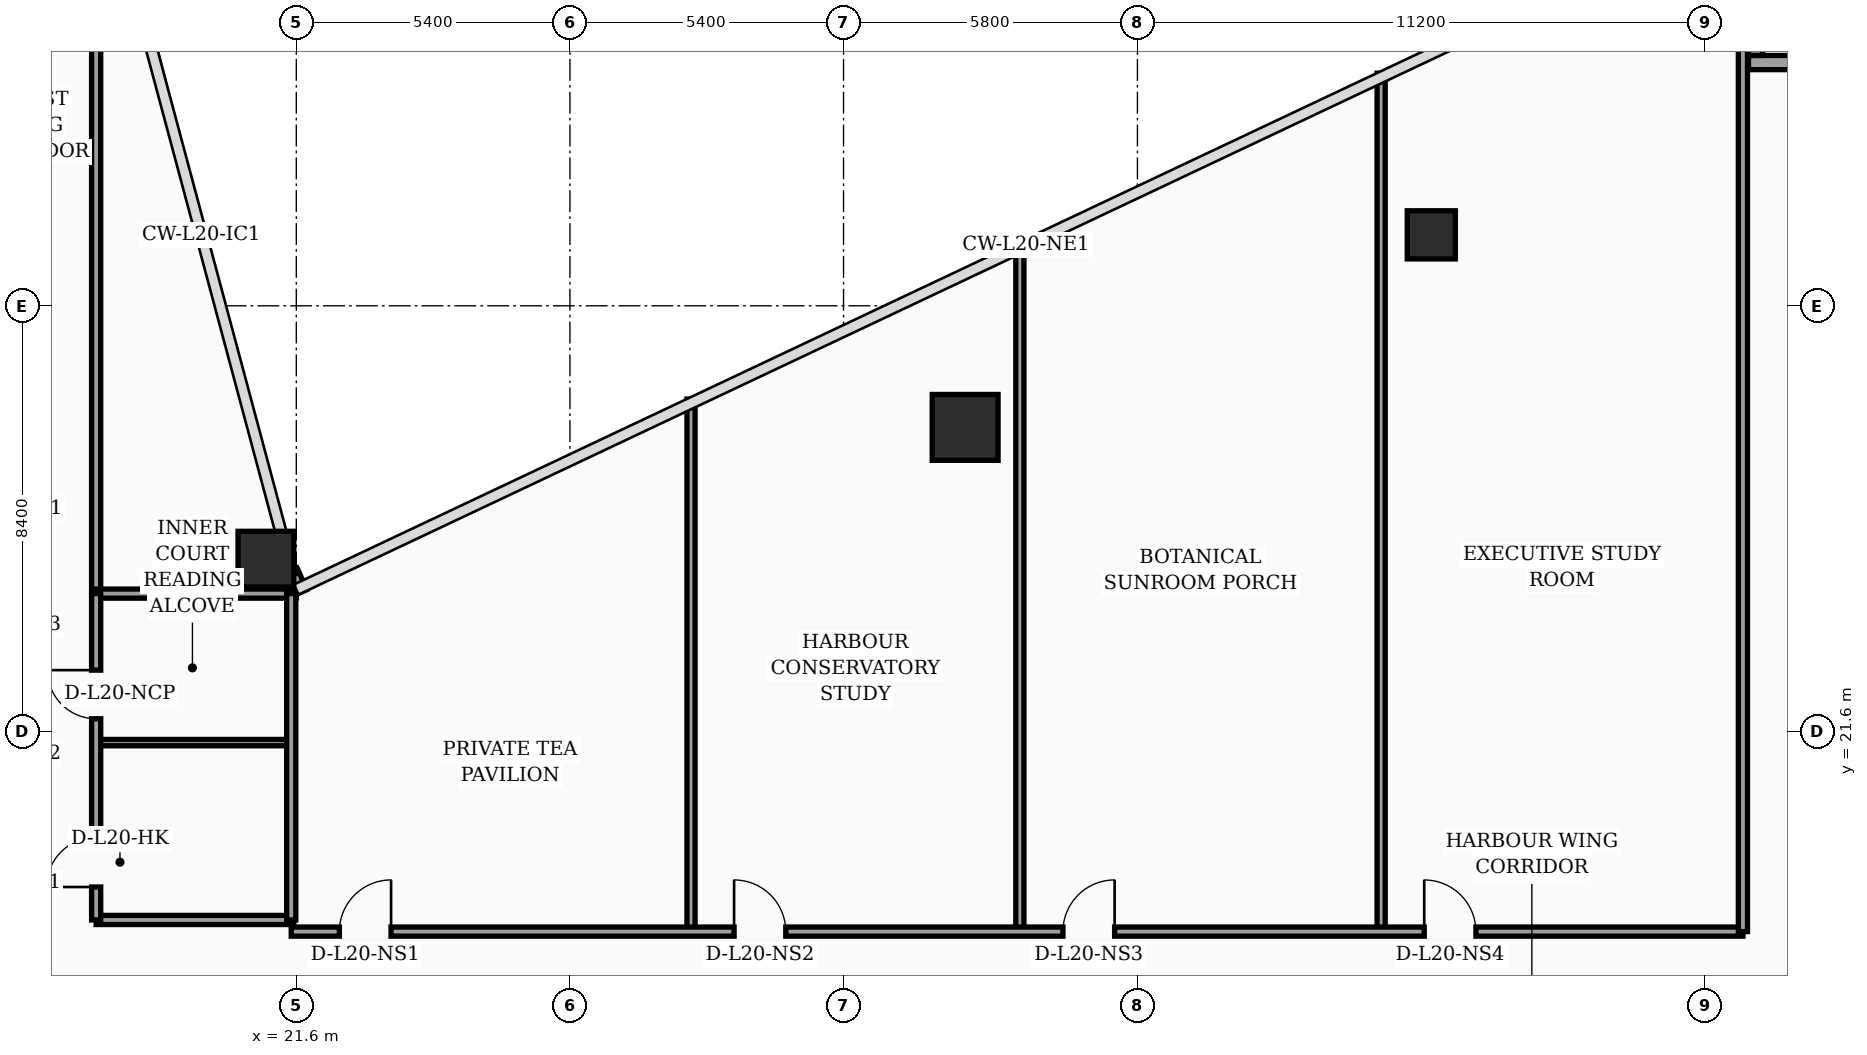
"""IFC4 building model, lengths in metres.
Left out: names, types, materials, properties, quantities, classifications, styles, units other than length and angle.
Written with IfcOpenShell. Run it as: python <this file> out.ifc"""

import sys

from ifc_helpers import new_model, si_unit, direction, frame, frame_2d, origin, origin_2d, place, context, subcontext, project, spatial, rectangle, hollow_rectangle, circle, extrude, element, fill, save


model = new_model("IFC4")
c1 = context("Model", 3, precision=1e-05, world=origin(), true_north=direction((0.0, 1.0)))
c2 = subcontext(c1, "Body", "Model", "MODEL_VIEW")
j1 = project(units=[si_unit("LENGTHUNIT", "METRE"), si_unit("PLANEANGLEUNIT", "RADIAN")], contexts=[c1])
p1 = place(None, origin())
s1 = spatial("IfcSite", under=j1, at=p1, CompositionType="ELEMENT")
p2 = place(p1, origin())
s2 = spatial("IfcBuilding", under=s1, at=p2, CompositionType="ELEMENT")
p3 = place(p2, frame((0.0, 0.0, 85.0)))
s3 = spatial("IfcBuildingStorey", under=s2, at=p3, CompositionType="ELEMENT", Elevation=85.0)
p4 = place(p3, frame((21.0, 25.0, 0.0), z_axis=(0.0, 0.0, 1.0), x_axis=(1.0, 0.0, 0.0)))
e1 = element("IfcColumn", 1, at=p4, inside=s3, PredefinedType="COLUMN", context=c2, shape_type="SweptSolid", body=[
    extrude(hollow_rectangle(XDim=1.1, YDim=1.1, WallThickness=0.045, at=origin_2d()), origin(), (0.0, 0.0, 1.0), 3.56),
])
p5 = place(p3, frame((34.8, 27.6, 0.0), z_axis=(0.0, 0.0, 1.0), x_axis=(1.0, 0.0, 0.0)))
e2 = element("IfcColumn", 2, at=p5, inside=s3, PredefinedType="COLUMN", context=c2, shape_type="SweptSolid", body=[
    extrude(circle(Radius=0.65, at=origin_2d()), origin(), (0.0, 0.0, 1.0), 3.56),
])
p6 = place(p3, frame((44.0, 31.4, 0.0), z_axis=(0.0, 0.0, 1.0), x_axis=(1.0, 0.0, 0.0)))
e3 = element("IfcColumn", 3, at=p6, inside=s3, PredefinedType="COLUMN", context=c2, shape_type="SweptSolid", body=[
    extrude(hollow_rectangle(XDim=0.95, YDim=0.95, WallThickness=0.04, at=origin_2d()), origin(), (0.0, 0.0, 1.0), 3.56),
])
p7 = place(p3, frame((21.68, 24.34, 0.0), z_axis=(0.0, 0.0, 1.0), x_axis=(-0.40758134973, 0.913168901875, 0.0)))
e4 = element("IfcWall", 4, at=p7, inside=s3, PredefinedType="SOLIDWALL", context=c2, shape_type="SweptSolid", body=[
    extrude(rectangle(XDim=0.471, YDim=0.28, at=frame_2d((0.235, 0.0))), origin(), (0.0, 0.0, 1.0), 3.56),
])
p8 = place(p3, frame((54.44, 34.8, 0.0), z_axis=(0.0, 0.0, 1.0), x_axis=(-1.0, 0.0, 0.0)))
e5 = element("IfcWall", 5, at=p8, inside=s3, PredefinedType="SOLIDWALL", context=c2, shape_type="SweptSolid", body=[
    extrude(rectangle(XDim=4.18, YDim=0.28, at=frame_2d((2.09, 0.0))), origin(), (0.0, 0.0, 1.0), 3.56),
])
p9 = place(p3, frame((50.4, 34.94, 0.0), z_axis=(0.0, 0.0, 1.0), x_axis=(0.0, 1.0, 0.0)))
e6 = element("IfcWall", 6, at=p9, inside=s3, PredefinedType="SOLIDWALL", context=c2, shape_type="SweptSolid", body=[
    extrude(rectangle(XDim=3.1, YDim=0.28, at=frame_2d((1.55, 0.0))), origin(), (0.0, 0.0, 1.0), 3.56),
])
p10 = place(p3, frame((17.65, 24.3, 0.0), z_axis=(0.0, 0.0, 1.0), x_axis=(0.0, 1.0, 0.0)))
e7 = element("IfcWall", 7, at=p10, inside=s3, PredefinedType="PARTITIONING", context=c2, shape_type="SweptSolid", body=[
    extrude(rectangle(XDim=16.4, YDim=0.18, at=frame_2d((8.2, 0.0))), origin(), (0.0, 0.0, 1.0), 2.84),
])
p11 = place(p3, frame((17.65, 17.88, 0.0), z_axis=(0.0, 0.0, 1.0), x_axis=(1.0, 0.0, 0.0)))
e8 = element("IfcWall", 8, at=p11, inside=s3, PredefinedType="PARTITIONING", context=c2, shape_type="SweptSolid", body=[
    extrude(rectangle(XDim=3.9, YDim=0.18, at=frame_2d((1.95, 0.0))), origin(), (0.0, 0.0, 1.0), 3.56),
])
p12 = place(p3, frame((17.65, 21.38, 0.0), z_axis=(0.0, 0.0, 1.0), x_axis=(1.0, 0.0, 0.0)))
e9 = element("IfcWall", 9, at=p12, inside=s3, PredefinedType="PARTITIONING", context=c2, shape_type="SweptSolid", body=[
    extrude(rectangle(XDim=3.9, YDim=0.125, at=frame_2d((1.95, 0.0))), origin(), (0.0, 0.0, 1.0), 3.09),
])
p13 = place(p3, frame((17.65, 24.32, 0.0), z_axis=(0.0, 0.0, 1.0), x_axis=(1.0, 0.0, 0.0)))
e10 = element("IfcWall", 10, at=p13, inside=s3, PredefinedType="PARTITIONING", context=c2, shape_type="SweptSolid", body=[
    extrude(rectangle(XDim=3.95, YDim=0.18, at=frame_2d((1.975, 0.0))), origin(), (0.0, 0.0, 1.0), 3.56),
])
p14 = place(p3, frame((21.5, 17.88, 0.0), z_axis=(0.0, 0.0, 1.0), x_axis=(0.0, 1.0, 0.0)))
e11 = element("IfcWall", 11, at=p14, inside=s3, PredefinedType="PARTITIONING", context=c2, shape_type="SweptSolid", body=[
    extrude(rectangle(XDim=6.44, YDim=0.18, at=frame_2d((3.22, 0.0))), origin(), (0.0, 0.0, 1.0), 3.09),
])
p15 = place(p3, frame((17.65, 17.88, 0.0), z_axis=(0.0, 0.0, 1.0), x_axis=(0.0, 1.0, 0.0)))
e12 = element("IfcWall", 12, at=p15, inside=s3, PredefinedType="PARTITIONING", context=c2, shape_type="SweptSolid", body=[
    extrude(rectangle(XDim=6.44, YDim=0.18, at=frame_2d((3.22, 0.0))), origin(), (0.0, 0.0, 1.0), 3.09),
])
p16 = place(p15, frame((0.65, 0.0, 0.0)))
e13 = element("IfcOpeningElement", 13, at=p16, cuts=e12, PredefinedType="OPENING", context=c2, shape_type="SweptSolid", body=[
    extrude(rectangle(XDim=0.98, YDim=2.15, at=frame_2d((0.49, 1.075))), frame((0.0, 0.1, 0.0), z_axis=(0.0, -1.0, 0.0), x_axis=(1.0, 0.0, 0.0)), (0.0, 0.0, 1.0), 0.2),
])
p17 = place(p15, frame((3.97, 0.0, 0.0)))
e14 = element("IfcOpeningElement", 14, at=p17, cuts=e12, PredefinedType="OPENING", context=c2, shape_type="SweptSolid", body=[
    extrude(rectangle(XDim=0.96, YDim=2.2, at=frame_2d((0.48, 1.1))), frame((0.0, 0.1, 0.0), z_axis=(0.0, -1.0, 0.0), x_axis=(1.0, 0.0, 0.0)), (0.0, 0.0, 1.0), 0.2),
])
p18 = place(p3, frame((29.39, 17.65, 0.0), z_axis=(0.0, 0.0, 1.0), x_axis=(0.0, 1.0, 0.0)))
e15 = element("IfcWall", 15, at=p18, inside=s3, PredefinedType="PARTITIONING", context=c2, shape_type="SweptSolid", body=[
    extrude(rectangle(XDim=10.51, YDim=0.16, at=frame_2d((5.255, 0.0))), origin(), (0.0, 0.0, 1.0), 2.84),
])
p19 = place(p3, frame((35.88, 17.65, 0.0), z_axis=(0.0, 0.0, 1.0), x_axis=(0.0, 1.0, 0.0)))
e16 = element("IfcWall", 16, at=p19, inside=s3, PredefinedType="PARTITIONING", context=c2, shape_type="SweptSolid", body=[
    extrude(rectangle(XDim=13.57, YDim=0.16, at=frame_2d((6.785, 0.0))), origin(), (0.0, 0.0, 1.0), 2.84),
])
p20 = place(p3, frame((43.01, 17.65, 0.0), z_axis=(0.0, 0.0, 1.0), x_axis=(0.0, 1.0, 0.0)))
e17 = element("IfcWall", 17, at=p20, inside=s3, PredefinedType="PARTITIONING", context=c2, shape_type="SweptSolid", body=[
    extrude(rectangle(XDim=16.94, YDim=0.16, at=frame_2d((8.47, 0.0))), origin(), (0.0, 0.0, 1.0), 2.84),
])
p21 = place(p3, frame((21.5, 17.65, 0.0), z_axis=(0.0, 0.0, 1.0), x_axis=(1.0, 0.0, 0.0)))
e18 = element("IfcWall", 18, at=p21, inside=s3, PredefinedType="PARTITIONING", context=c2, shape_type="SweptSolid", body=[
    extrude(rectangle(XDim=28.65, YDim=0.18, at=frame_2d((14.325, 0.0))), origin(), (0.0, 0.0, 1.0), 2.84),
])
p22 = place(p21, frame((0.95, 0.0, 0.0)))
e19 = element("IfcOpeningElement", 19, at=p22, cuts=e18, PredefinedType="OPENING", context=c2, shape_type="SweptSolid", body=[
    extrude(rectangle(XDim=1.02, YDim=2.2, at=frame_2d((0.51, 1.1))), frame((0.0, 0.1, 0.0), z_axis=(0.0, -1.0, 0.0), x_axis=(1.0, 0.0, 0.0)), (0.0, 0.0, 1.0), 0.2),
])
p23 = place(p21, frame((8.74, 0.0, 0.0)))
e20 = element("IfcOpeningElement", 20, at=p23, cuts=e18, PredefinedType="OPENING", context=c2, shape_type="SweptSolid", body=[
    extrude(rectangle(XDim=1.02, YDim=2.2, at=frame_2d((0.51, 1.1))), frame((0.0, 0.1, 0.0), z_axis=(0.0, -1.0, 0.0), x_axis=(1.0, 0.0, 0.0)), (0.0, 0.0, 1.0), 0.2),
])
p24 = place(p21, frame((15.23, 0.0, 0.0)))
e21 = element("IfcOpeningElement", 21, at=p24, cuts=e18, PredefinedType="OPENING", context=c2, shape_type="SweptSolid", body=[
    extrude(rectangle(XDim=1.02, YDim=2.2, at=frame_2d((0.51, 1.1))), frame((0.0, 0.1, 0.0), z_axis=(0.0, -1.0, 0.0), x_axis=(1.0, 0.0, 0.0)), (0.0, 0.0, 1.0), 0.2),
])
p25 = place(p21, frame((22.36, 0.0, 0.0)))
e22 = element("IfcOpeningElement", 22, at=p25, cuts=e18, PredefinedType="OPENING", context=c2, shape_type="SweptSolid", body=[
    extrude(rectangle(XDim=1.02, YDim=2.2, at=frame_2d((0.51, 1.1))), frame((0.0, 0.1, 0.0), z_axis=(0.0, -1.0, 0.0), x_axis=(1.0, 0.0, 0.0)), (0.0, 0.0, 1.0), 0.2),
])
p26 = place(p3, frame((50.15, 17.65, 0.0), z_axis=(0.0, 0.0, 1.0), x_axis=(0.0, 1.0, 0.0)))
e23 = element("IfcWall", 23, at=p26, inside=s3, PredefinedType="PARTITIONING", context=c2, shape_type="SweptSolid", body=[
    extrude(rectangle(XDim=20.31, YDim=0.18, at=frame_2d((10.155, 0.0))), origin(), (0.0, 0.0, 1.0), 2.84),
])
p27 = place(p16, origin())
e24 = element("IfcDoor", 24, at=p27, inside=s3, OperationType="SINGLE_SWING_LEFT", PredefinedType="DOOR", context=c2, shape_type="SweptSolid", body=[
    extrude(rectangle(XDim=0.98, YDim=2.15, at=frame_2d((0.49, 1.075))), frame((0.0, 0.025, 0.0), z_axis=(0.0, -1.0, 0.0), x_axis=(1.0, 0.0, 0.0)), (0.0, 0.0, 1.0), 0.05),
])
fill(e13, e24)
p28 = place(p17, origin())
e25 = element("IfcDoor", 25, at=p28, inside=s3, OperationType="SINGLE_SWING_RIGHT", PredefinedType="DOOR", context=c2, shape_type="SweptSolid", body=[
    extrude(rectangle(XDim=0.96, YDim=2.2, at=frame_2d((0.48, 1.1))), frame((0.0, 0.025, 0.0), z_axis=(0.0, -1.0, 0.0), x_axis=(1.0, 0.0, 0.0)), (0.0, 0.0, 1.0), 0.05),
])
fill(e14, e25)
p29 = place(p22, origin())
e26 = element("IfcDoor", 26, at=p29, inside=s3, OperationType="SINGLE_SWING_RIGHT", PredefinedType="DOOR", context=c2, shape_type="SweptSolid", body=[
    extrude(rectangle(XDim=1.02, YDim=2.2, at=frame_2d((0.51, 1.1))), frame((0.0, 0.025, 0.0), z_axis=(0.0, -1.0, 0.0), x_axis=(1.0, 0.0, 0.0)), (0.0, 0.0, 1.0), 0.05),
])
fill(e19, e26)
p30 = place(p23, origin())
e27 = element("IfcDoor", 27, at=p30, inside=s3, OperationType="SINGLE_SWING_LEFT", PredefinedType="DOOR", context=c2, shape_type="SweptSolid", body=[
    extrude(rectangle(XDim=1.02, YDim=2.2, at=frame_2d((0.51, 1.1))), frame((0.0, 0.025, 0.0), z_axis=(0.0, -1.0, 0.0), x_axis=(1.0, 0.0, 0.0)), (0.0, 0.0, 1.0), 0.05),
])
fill(e20, e27)
p31 = place(p24, origin())
e28 = element("IfcDoor", 28, at=p31, inside=s3, OperationType="SINGLE_SWING_RIGHT", PredefinedType="DOOR", context=c2, shape_type="SweptSolid", body=[
    extrude(rectangle(XDim=1.02, YDim=2.2, at=frame_2d((0.51, 1.1))), frame((0.0, 0.025, 0.0), z_axis=(0.0, -1.0, 0.0), x_axis=(1.0, 0.0, 0.0)), (0.0, 0.0, 1.0), 0.05),
])
fill(e21, e28)
p32 = place(p25, origin())
e29 = element("IfcDoor", 29, at=p32, inside=s3, OperationType="SINGLE_SWING_LEFT", PredefinedType="DOOR", context=c2, shape_type="SweptSolid", body=[
    extrude(rectangle(XDim=1.02, YDim=2.2, at=frame_2d((0.51, 1.1))), frame((0.0, 0.025, 0.0), z_axis=(0.0, -1.0, 0.0), x_axis=(1.0, 0.0, 0.0)), (0.0, 0.0, 1.0), 0.05),
])
fill(e22, e29)
save(model, sys.argv[1])
